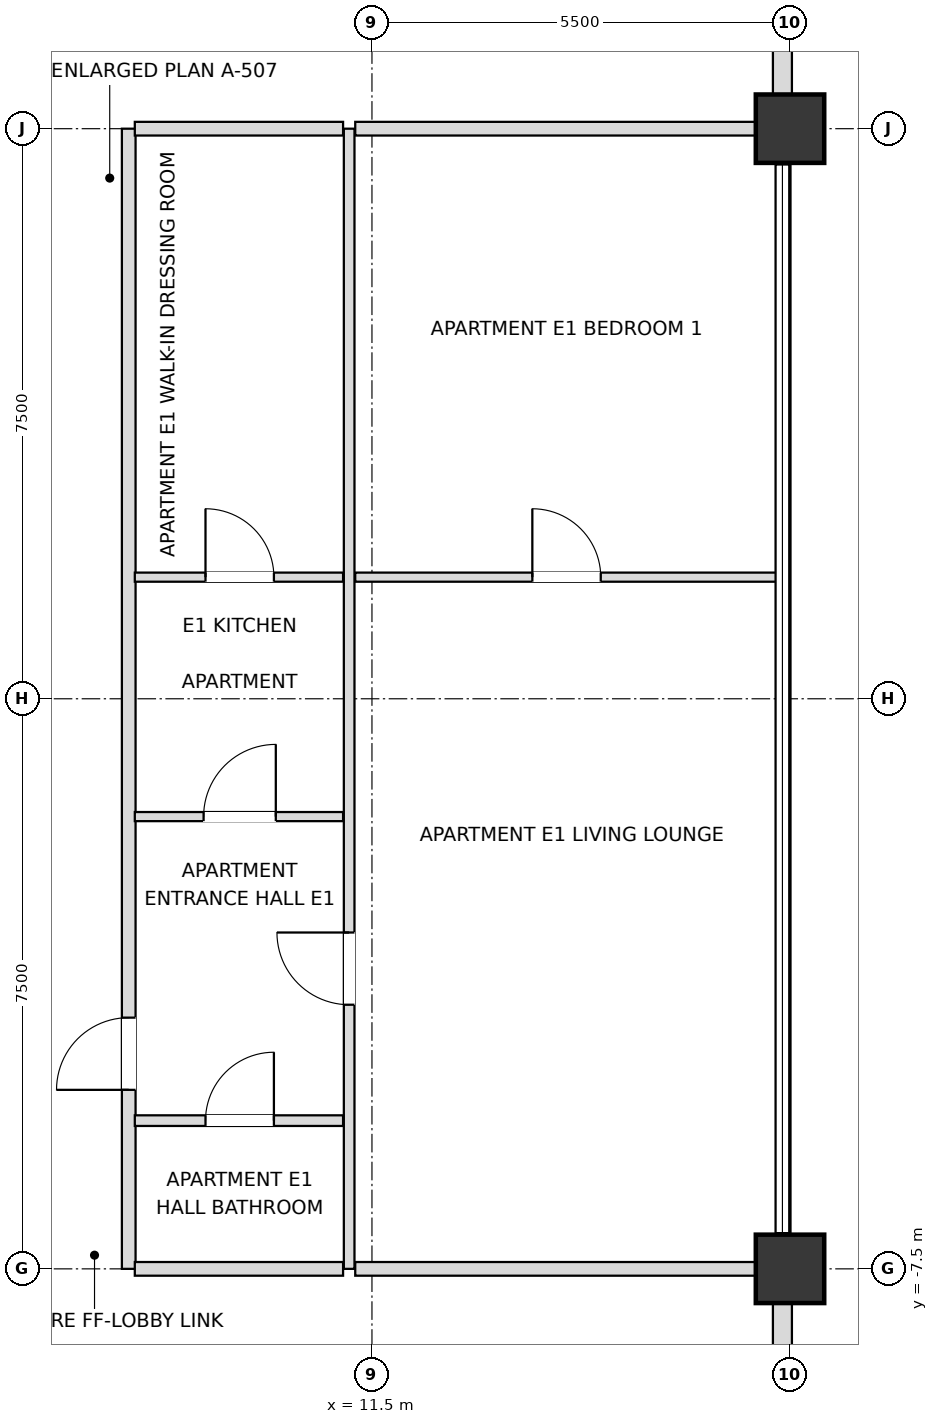
"""IFC4 building model, lengths in metres.
Left out: names, types, materials, properties, quantities, classifications, styles, units other than length and angle.
Written with IfcOpenShell. Run it as: python <this file> out.ifc"""

import sys

from ifc_helpers import new_model, si_unit, direction, frame, frame_2d, origin, origin_2d, place, context, subcontext, project, spatial, rectangle, extrude, element, fill, save


model = new_model("IFC4")
c1 = context("Model", 3, precision=1e-05, world=origin(), true_north=direction((0.0, 1.0)))
c2 = subcontext(c1, "Body", "Model", "MODEL_VIEW")
j1 = project(units=[si_unit("LENGTHUNIT", "METRE"), si_unit("PLANEANGLEUNIT", "RADIAN")], contexts=[c1])
p1 = place(None, origin())
s1 = spatial("IfcSite", under=j1, at=p1, CompositionType="ELEMENT")
p2 = place(p1, origin())
s2 = spatial("IfcBuilding", under=s1, at=p2, CompositionType="ELEMENT")
p3 = place(p2, frame((0.0, 0.0, 233.1)))
s3 = spatial("IfcBuildingStorey", under=s2, at=p3, CompositionType="ELEMENT", Elevation=233.1)
for number, where, z_axis, x_axis in (
    (1, (17.0, -7.5, 0.0), (0.0, 0.0, 1.0), (1.0, 0.0, 0.0)),
    (2, (17.0, 7.5, 0.0), (0.0, 0.0, 1.0), (1.0, 0.0, 0.0)),
):
    element("IfcColumn", number, at=place(p3, frame(where, z_axis=z_axis, x_axis=x_axis)), inside=s3, PredefinedType="USERDEFINED", context=c2, shape_type="SweptSolid", body=[
        extrude(rectangle(XDim=0.9, YDim=0.9, at=origin_2d()), origin(), (0.0, 0.0, 1.0), 3.6),
    ])
p4 = place(p3, frame((16.9, -12.555, 0.0), z_axis=(0.0, 0.0, 1.0), x_axis=(0.0, 1.0, 0.0)))
e3 = element("IfcWall", 3, at=p4, inside=s3, PredefinedType="SOLIDWALL", context=c2, shape_type="SweptSolid", body=[
    extrude(rectangle(XDim=4.61, YDim=0.25, at=frame_2d((2.305, 0.0))), origin(), (0.0, 0.0, 1.0), 2.748),
])
p5 = place(p4, frame((1.405, 0.0, 0.72)))
e4 = element("IfcOpeningElement", 4, at=p5, cuts=e3, PredefinedType="OPENING", context=c2, shape_type="SweptSolid", body=[
    extrude(rectangle(XDim=1.8, YDim=1.68, at=frame_2d((0.9, 0.84))), frame((0.0, 0.135, 0.0), z_axis=(0.0, -1.0, 0.0), x_axis=(1.0, 0.0, 0.0)), (0.0, 0.0, 1.0), 0.27),
])
p6 = place(p3, frame((16.9, 7.945, 0.0), z_axis=(0.0, 0.0, 1.0), x_axis=(0.0, 1.0, 0.0)))
e5 = element("IfcWall", 5, at=p6, inside=s3, PredefinedType="SOLIDWALL", context=c2, shape_type="SweptSolid", body=[
    extrude(rectangle(XDim=4.61, YDim=0.25, at=frame_2d((2.305, 0.0))), origin(), (0.0, 0.0, 1.0), 2.748),
])
p7 = place(p6, frame((1.405, 0.0, 0.72)))
e6 = element("IfcOpeningElement", 6, at=p7, cuts=e5, PredefinedType="OPENING", context=c2, shape_type="SweptSolid", body=[
    extrude(rectangle(XDim=1.8, YDim=1.68, at=frame_2d((0.9, 0.84))), frame((0.0, 0.135, 0.0), z_axis=(0.0, -1.0, 0.0), x_axis=(1.0, 0.0, 0.0)), (0.0, 0.0, 1.0), 0.27),
])
p8 = place(p3, frame((8.3, -7.5, 0.0), z_axis=(0.0, 0.0, 1.0), x_axis=(0.0, 1.0, 0.0)))
e7 = element("IfcWall", 7, at=p8, inside=s3, PredefinedType="PARTITIONING", context=c2, shape_type="SweptSolid", body=[
    extrude(rectangle(XDim=15.0, YDim=0.18, at=frame_2d((7.5, 0.0))), origin(), (0.0, 0.0, 1.0), 3.38),
])
p9 = place(p8, frame((2.355, 0.0, 0.0)))
e8 = element("IfcOpeningElement", 8, at=p9, cuts=e7, PredefinedType="OPENING", context=c2, shape_type="SweptSolid", body=[
    extrude(rectangle(XDim=0.95, YDim=2.15, at=frame_2d((0.475, 1.075))), frame((0.0, 0.1, 0.0), z_axis=(0.0, -1.0, 0.0), x_axis=(1.0, 0.0, 0.0)), (0.0, 0.0, 1.0), 0.2),
])
p10 = place(p3, frame((11.2, -7.5, 0.0), z_axis=(0.0, 0.0, 1.0), x_axis=(0.0, 1.0, 0.0)))
e9 = element("IfcWall", 9, at=p10, inside=s3, PredefinedType="PARTITIONING", context=c2, shape_type="SweptSolid", body=[
    extrude(rectangle(XDim=15.0, YDim=0.14, at=frame_2d((7.5, 0.0))), origin(), (0.0, 0.0, 1.0), 3.38),
])
p11 = place(p10, frame((3.475, 0.0, 0.0)))
e10 = element("IfcOpeningElement", 10, at=p11, cuts=e9, PredefinedType="OPENING", context=c2, shape_type="SweptSolid", body=[
    extrude(rectangle(XDim=0.95, YDim=2.1, at=frame_2d((0.475, 1.05))), frame((0.0, 0.08, 0.0), z_axis=(0.0, -1.0, 0.0), x_axis=(1.0, 0.0, 0.0)), (0.0, 0.0, 1.0), 0.16),
])
p12 = place(p3, frame((8.38, -7.5, 0.0), z_axis=(0.0, 0.0, 1.0), x_axis=(1.0, 0.0, 0.0)))
e11 = element("IfcWall", 11, at=p12, inside=s3, PredefinedType="PARTITIONING", context=c2, shape_type="SweptSolid", body=[
    extrude(rectangle(XDim=2.74, YDim=0.18, at=frame_2d((1.37, 0.0))), origin(), (0.0, 0.0, 1.0), 2.826),
])
p13 = place(p3, frame((11.28, -7.5, 0.0), z_axis=(0.0, 0.0, 1.0), x_axis=(1.0, 0.0, 0.0)))
e12 = element("IfcWall", 12, at=p13, inside=s3, PredefinedType="PARTITIONING", context=c2, shape_type="SweptSolid", body=[
    extrude(rectangle(XDim=5.62, YDim=0.18, at=frame_2d((2.81, 0.0))), origin(), (0.0, 0.0, 1.0), 2.826),
])
p14 = place(p3, frame((8.38, -5.55, 0.0), z_axis=(0.0, 0.0, 1.0), x_axis=(1.0, 0.0, 0.0)))
e13 = element("IfcWall", 13, at=p14, inside=s3, PredefinedType="PARTITIONING", context=c2, shape_type="SweptSolid", body=[
    extrude(rectangle(XDim=2.74, YDim=0.14, at=frame_2d((1.37, 0.0))), origin(), (0.0, 0.0, 1.0), 3.38),
])
p15 = place(p14, frame((0.93, 0.0, 0.0)))
e14 = element("IfcOpeningElement", 14, at=p15, cuts=e13, PredefinedType="OPENING", context=c2, shape_type="SweptSolid", body=[
    extrude(rectangle(XDim=0.9, YDim=2.1, at=frame_2d((0.45, 1.05))), frame((0.0, 0.08, 0.0), z_axis=(0.0, -1.0, 0.0), x_axis=(1.0, 0.0, 0.0)), (0.0, 0.0, 1.0), 0.16),
])
p16 = place(p3, frame((8.38, -1.55, 0.0), z_axis=(0.0, 0.0, 1.0), x_axis=(1.0, 0.0, 0.0)))
e15 = element("IfcWall", 15, at=p16, inside=s3, PredefinedType="PARTITIONING", context=c2, shape_type="SweptSolid", body=[
    extrude(rectangle(XDim=2.74, YDim=0.12, at=frame_2d((1.37, 0.0))), origin(), (0.0, 0.0, 1.0), 3.38),
])
p17 = place(p16, frame((0.905, 0.0, 0.0)))
e16 = element("IfcOpeningElement", 16, at=p17, cuts=e15, PredefinedType="OPENING", context=c2, shape_type="SweptSolid", body=[
    extrude(rectangle(XDim=0.95, YDim=2.1, at=frame_2d((0.475, 1.05))), frame((0.0, 0.07, 0.0), z_axis=(0.0, -1.0, 0.0), x_axis=(1.0, 0.0, 0.0)), (0.0, 0.0, 1.0), 0.14),
])
p18 = place(p3, frame((8.38, 1.6, 0.0), z_axis=(0.0, 0.0, 1.0), x_axis=(1.0, 0.0, 0.0)))
e17 = element("IfcWall", 17, at=p18, inside=s3, PredefinedType="PARTITIONING", context=c2, shape_type="SweptSolid", body=[
    extrude(rectangle(XDim=2.74, YDim=0.12, at=frame_2d((1.37, 0.0))), origin(), (0.0, 0.0, 1.0), 3.38),
])
p19 = place(p18, frame((0.93, 0.0, 0.0)))
e18 = element("IfcOpeningElement", 18, at=p19, cuts=e17, PredefinedType="OPENING", context=c2, shape_type="SweptSolid", body=[
    extrude(rectangle(XDim=0.9, YDim=2.1, at=frame_2d((0.45, 1.05))), frame((0.0, 0.07, 0.0), z_axis=(0.0, -1.0, 0.0), x_axis=(1.0, 0.0, 0.0)), (0.0, 0.0, 1.0), 0.14),
])
p20 = place(p3, frame((11.28, 1.6, 0.0), z_axis=(0.0, 0.0, 1.0), x_axis=(1.0, 0.0, 0.0)))
e19 = element("IfcWall", 19, at=p20, inside=s3, PredefinedType="PARTITIONING", context=c2, shape_type="SweptSolid", body=[
    extrude(rectangle(XDim=5.54, YDim=0.12, at=frame_2d((2.77, 0.0))), origin(), (0.0, 0.0, 1.0), 3.018),
])
p21 = place(p20, frame((2.33, 0.0, 0.0)))
e20 = element("IfcOpeningElement", 20, at=p21, cuts=e19, PredefinedType="OPENING", context=c2, shape_type="SweptSolid", body=[
    extrude(rectangle(XDim=0.9, YDim=2.1, at=frame_2d((0.45, 1.05))), frame((0.0, 0.07, 0.0), z_axis=(0.0, -1.0, 0.0), x_axis=(1.0, 0.0, 0.0)), (0.0, 0.0, 1.0), 0.14),
])
p22 = place(p3, frame((8.38, 7.5, 0.0), z_axis=(0.0, 0.0, 1.0), x_axis=(1.0, 0.0, 0.0)))
e21 = element("IfcWall", 21, at=p22, inside=s3, PredefinedType="PARTITIONING", context=c2, shape_type="SweptSolid", body=[
    extrude(rectangle(XDim=2.74, YDim=0.18, at=frame_2d((1.37, 0.0))), origin(), (0.0, 0.0, 1.0), 2.826),
])
p23 = place(p3, frame((11.28, 7.5, 0.0), z_axis=(0.0, 0.0, 1.0), x_axis=(1.0, 0.0, 0.0)))
e22 = element("IfcWall", 22, at=p23, inside=s3, PredefinedType="PARTITIONING", context=c2, shape_type="SweptSolid", body=[
    extrude(rectangle(XDim=5.62, YDim=0.18, at=frame_2d((2.81, 0.0))), origin(), (0.0, 0.0, 1.0), 2.826),
])
p24 = place(p15, origin())
e23 = element("IfcDoor", 23, at=p24, inside=s3, OperationType="SINGLE_SWING_RIGHT", PredefinedType="DOOR", context=c2, shape_type="SweptSolid", body=[
    extrude(rectangle(XDim=0.9, YDim=2.1, at=frame_2d((0.45, 1.05))), frame((0.0, 0.025, 0.0), z_axis=(0.0, -1.0, 0.0), x_axis=(1.0, 0.0, 0.0)), (0.0, 0.0, 1.0), 0.05),
])
fill(e14, e23)
p25 = place(p9, origin())
e24 = element("IfcDoor", 24, at=p25, inside=s3, OperationType="SINGLE_SWING_LEFT", PredefinedType="DOOR", context=c2, shape_type="SweptSolid", body=[
    extrude(rectangle(XDim=0.95, YDim=2.15, at=frame_2d((0.475, 1.075))), frame((0.0, 0.025, 0.0), z_axis=(0.0, -1.0, 0.0), x_axis=(1.0, 0.0, 0.0)), (0.0, 0.0, 1.0), 0.05),
])
fill(e8, e24)
p26 = place(p17, origin())
e25 = element("IfcDoor", 25, at=p26, inside=s3, OperationType="SINGLE_SWING_RIGHT", PredefinedType="DOOR", context=c2, shape_type="SweptSolid", body=[
    extrude(rectangle(XDim=0.95, YDim=2.1, at=frame_2d((0.475, 1.05))), frame((0.0, 0.025, 0.0), z_axis=(0.0, -1.0, 0.0), x_axis=(1.0, 0.0, 0.0)), (0.0, 0.0, 1.0), 0.05),
])
fill(e16, e25)
p27 = place(p19, origin())
e26 = element("IfcDoor", 26, at=p27, inside=s3, OperationType="SINGLE_SWING_LEFT", PredefinedType="DOOR", context=c2, shape_type="SweptSolid", body=[
    extrude(rectangle(XDim=0.9, YDim=2.1, at=frame_2d((0.45, 1.05))), frame((0.0, 0.025, 0.0), z_axis=(0.0, -1.0, 0.0), x_axis=(1.0, 0.0, 0.0)), (0.0, 0.0, 1.0), 0.05),
])
fill(e18, e26)
p28 = place(p11, origin())
e27 = element("IfcDoor", 27, at=p28, inside=s3, OperationType="SINGLE_SWING_RIGHT", PredefinedType="DOOR", context=c2, shape_type="SweptSolid", body=[
    extrude(rectangle(XDim=0.95, YDim=2.1, at=frame_2d((0.475, 1.05))), frame((0.0, 0.025, 0.0), z_axis=(0.0, -1.0, 0.0), x_axis=(1.0, 0.0, 0.0)), (0.0, 0.0, 1.0), 0.05),
])
fill(e10, e27)
p29 = place(p21, origin())
e28 = element("IfcDoor", 28, at=p29, inside=s3, OperationType="SINGLE_SWING_LEFT", PredefinedType="DOOR", context=c2, shape_type="SweptSolid", body=[
    extrude(rectangle(XDim=0.9, YDim=2.1, at=frame_2d((0.45, 1.05))), frame((0.0, 0.025, 0.0), z_axis=(0.0, -1.0, 0.0), x_axis=(1.0, 0.0, 0.0)), (0.0, 0.0, 1.0), 0.05),
])
fill(e20, e28)
save(model, sys.argv[1])
